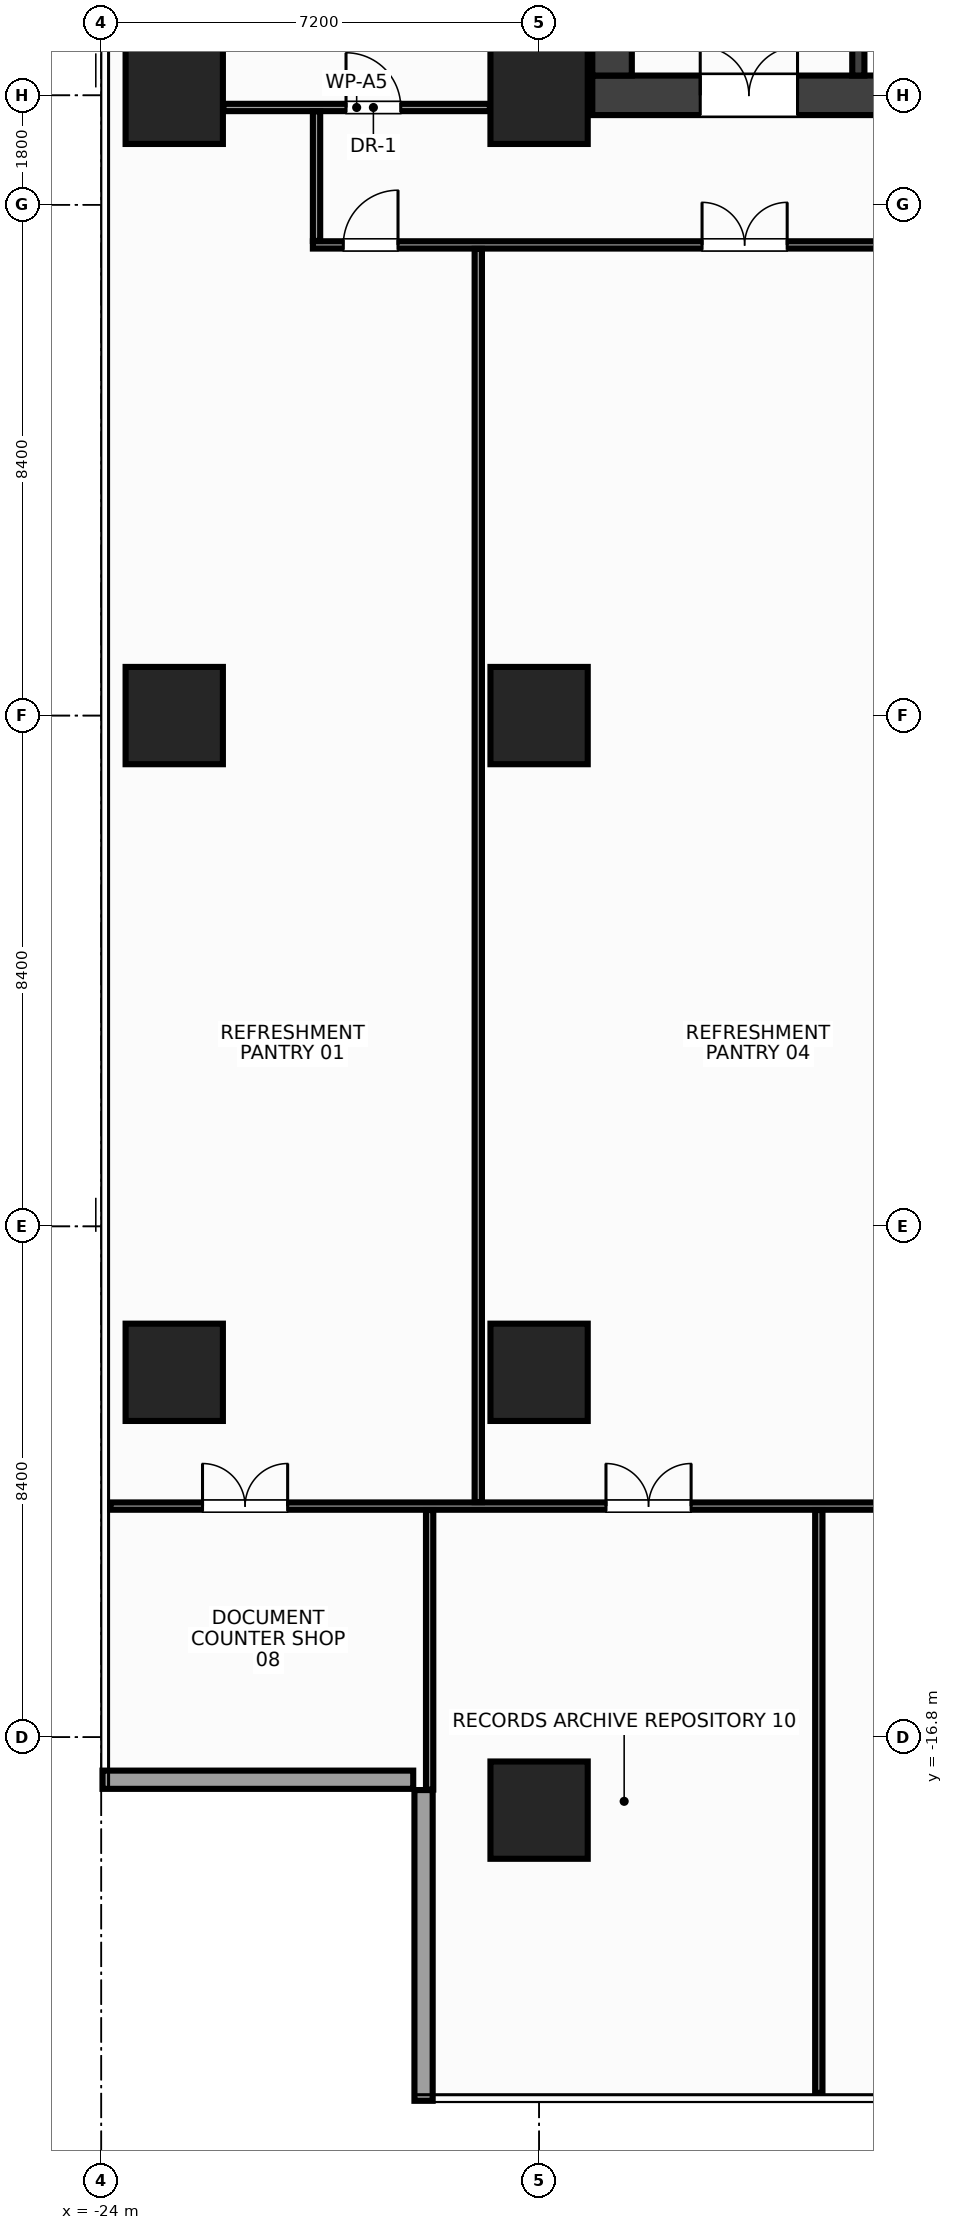
"""IFC4 building model, lengths in metres.
Left out: names, types, materials, properties, quantities, classifications, styles, units other than length and angle.
Written with IfcOpenShell. Run it as: python <this file> out.ifc"""

import sys

from ifc_helpers import new_model, si_unit, direction, frame, frame_2d, origin, origin_2d, place, context, subcontext, project, spatial, rectangle, extrude, source, transform, mapped, element, fill, save


model = new_model("IFC4")
c1 = context("Model", 3, precision=1e-05, world=origin(), true_north=direction((0.0, 1.0)))
c2 = subcontext(c1, "Body", "Model", "MODEL_VIEW")
j1 = project(units=[si_unit("LENGTHUNIT", "METRE"), si_unit("PLANEANGLEUNIT", "RADIAN")], contexts=[c1])
p1 = place(None, origin())
s1 = spatial("IfcSite", under=j1, at=p1, CompositionType="ELEMENT")
p2 = place(p1, origin())
s2 = spatial("IfcBuilding", under=s1, at=p2, CompositionType="ELEMENT")
p3 = place(p2, frame((0.0, 0.0, 182.0)))
s3 = spatial("IfcBuildingStorey", under=s2, at=p3, CompositionType="ELEMENT", Elevation=182.0)
m1 = source(origin(), c2, "Body", "SweptSolid", [
    extrude(rectangle(XDim=31.85, YDim=0.65, at=frame_2d((15.925, 0.0))), origin(), (0.0, 0.0, 1.0), 3.6),
])
p4 = place(p3, frame((-15.925, 10.2, 0.0), z_axis=(0.0, 0.0, 1.0), x_axis=(1.0, 0.0, 0.0)))
e1 = element("IfcWall", 1, at=p4, inside=s3, PredefinedType="SHEAR", context=c2, shape_type="MappedRepresentation", body=[
    mapped(m1, transform((0.0, 0.0, 0.0), x_axis=(1.0, 0.0, 0.0), y_axis=(0.0, 1.0, 0.0), z_axis=(0.0, 0.0, 1.0), scale=1.0)),
])
p5 = place(p4, frame((1.775, 0.0, 0.0)))
e2 = element("IfcOpeningElement", 2, at=p5, cuts=e1, PredefinedType="OPENING", context=c2, shape_type="SweptSolid", body=[
    extrude(rectangle(XDim=1.6, YDim=2.15, at=frame_2d((0.8, 1.075))), frame((0.0, 0.337, 0.0), z_axis=(0.0, -1.0, 0.0), x_axis=(1.0, 0.0, 0.0)), (0.0, 0.0, 1.0), 0.674),
])
p6 = place(p4, frame((28.475, 0.0, 0.0)))
e3 = element("IfcOpeningElement", 3, at=p6, cuts=e1, PredefinedType="OPENING", context=c2, shape_type="SweptSolid", body=[
    extrude(rectangle(XDim=1.6, YDim=2.15, at=frame_2d((0.8, 1.075))), frame((0.0, 0.337, 0.0), z_axis=(0.0, -1.0, 0.0), x_axis=(1.0, 0.0, 0.0)), (0.0, 0.0, 1.0), 0.674),
])
p7 = place(p4, frame((15.175, 0.0, 0.0)))
e4 = element("IfcOpeningElement", 4, at=p7, cuts=e1, PredefinedType="OPENING", context=c2, shape_type="SweptSolid", body=[
    extrude(rectangle(XDim=1.5, YDim=2.2, at=frame_2d((0.75, 1.1))), frame((0.0, 0.337, 0.0), z_axis=(0.0, -1.0, 0.0), x_axis=(1.0, 0.0, 0.0)), (0.0, 0.0, 1.0), 0.674),
])
m2 = source(origin(), c2, "Body", "SweptSolid", [
    extrude(rectangle(XDim=12.95, YDim=0.65, at=frame_2d((6.475, 0.0))), origin(), (0.0, 0.0, 1.0), 3.6),
])
p8 = place(p3, frame((-15.6, 10.525, 0.0), z_axis=(0.0, 0.0, 1.0), x_axis=(0.0, 1.0, 0.0)))
e5 = element("IfcWall", 5, at=p8, inside=s3, PredefinedType="SHEAR", context=c2, shape_type="MappedRepresentation", body=[
    mapped(m2, transform((0.0, 0.0, 0.0), x_axis=(1.0, 0.0, 0.0), y_axis=(0.0, 1.0, 0.0), z_axis=(0.0, 0.0, 1.0), scale=1.0)),
])
m3 = source(origin(), c2, "Body", "SweptSolid", [
    extrude(rectangle(XDim=3.125, YDim=0.2, at=frame_2d((1.562, 0.0))), origin(), (0.0, 0.0, 1.0), 3.6),
])
p9 = place(p3, frame((-11.55, 10.525, 0.0), z_axis=(0.0, 0.0, 1.0), x_axis=(0.0, 1.0, 0.0)))
e6 = element("IfcWall", 6, at=p9, inside=s3, PredefinedType="SHEAR", context=c2, shape_type="MappedRepresentation", body=[
    mapped(m3, transform((0.0, 0.0, 0.0), x_axis=(1.0, 0.0, 0.0), y_axis=(0.0, 1.0, 0.0), z_axis=(0.0, 0.0, 1.0), scale=1.0)),
])
p10 = place(p9, frame((0.9, 0.0, 0.0)))
e7 = element("IfcOpeningElement", 7, at=p10, cuts=e6, PredefinedType="OPENING", context=c2, shape_type="SweptSolid", body=[
    extrude(rectangle(XDim=1.1, YDim=2.15, at=frame_2d((0.55, 1.075))), frame((0.0, 0.112, 0.0), z_axis=(0.0, -1.0, 0.0), x_axis=(1.0, 0.0, 0.0)), (0.0, 0.0, 1.0), 0.224),
])
m4 = source(origin(), c2, "Body", "SweptSolid", [
    extrude(rectangle(XDim=1.6, YDim=1.6, at=origin_2d()), origin(), (0.0, 0.0, 1.0), 3.6),
])
for number, where, z_axis, x_axis in (
    (8, (-16.8, -18.0, 0.0), (0.0, 0.0, 1.0), (1.0, 0.0, 0.0)),
    (9, (-16.8, -10.8, 0.0), (0.0, 0.0, 1.0), (1.0, 0.0, 0.0)),
    (10, (-16.8, 0.0, 0.0), (0.0, 0.0, 1.0), (1.0, 0.0, 0.0)),
    (11, (-16.8, 10.2, 0.0), (0.0, 0.0, 1.0), (1.0, 0.0, 0.0)),
    (12, (-22.8, -10.8, 0.0), (0.0, 0.0, 1.0), (1.0, 0.0, 0.0)),
    (13, (-22.8, 0.0, 0.0), (0.0, 0.0, 1.0), (1.0, 0.0, 0.0)),
    (14, (-22.8, 10.2, 0.0), (0.0, 0.0, 1.0), (1.0, 0.0, 0.0)),
):
    element("IfcColumn", number, at=place(p3, frame(where, z_axis=z_axis, x_axis=x_axis)), inside=s3, PredefinedType="COLUMN", context=c2, shape_type="MappedRepresentation", body=[
        mapped(m4, transform((0.0, 0.0, 0.0), x_axis=(1.0, 0.0, 0.0), y_axis=(0.0, 1.0, 0.0), z_axis=(0.0, 0.0, 1.0), scale=1.0)),
    ])
m5 = source(origin(), c2, "Body", "SweptSolid", [
    extrude(rectangle(XDim=5.11, YDim=0.3, at=frame_2d((2.555, 0.0))), origin(), (0.0, 0.0, 1.0), 2.76),
])
p11 = place(p3, frame((-23.98, -17.5, 0.0), z_axis=(0.0, 0.0, 1.0), x_axis=(1.0, 0.0, 0.0)))
e15 = element("IfcWall", 15, at=p11, inside=s3, PredefinedType="STANDARD", context=c2, shape_type="MappedRepresentation", body=[
    mapped(m5, transform((0.0, 0.0, 0.0), x_axis=(1.0, 0.0, 0.0), y_axis=(0.0, 1.0, 0.0), z_axis=(0.0, 0.0, 1.0), scale=1.0)),
])
m6 = source(origin(), c2, "Body", "SweptSolid", [
    extrude(rectangle(XDim=5.11, YDim=0.3, at=frame_2d((2.555, 0.0))), origin(), (0.0, 0.0, 1.0), 2.76),
])
p12 = place(p3, frame((-18.7, -17.67, 0.0), z_axis=(0.0, 0.0, 1.0), x_axis=(0.0, -1.0, 0.0)))
e16 = element("IfcWall", 16, at=p12, inside=s3, PredefinedType="STANDARD", context=c2, shape_type="MappedRepresentation", body=[
    mapped(m6, transform((0.0, 0.0, 0.0), x_axis=(1.0, 0.0, 0.0), y_axis=(0.0, 1.0, 0.0), z_axis=(0.0, 0.0, 1.0), scale=1.0)),
])
m7 = source(origin(), c2, "Body", "SweptSolid", [
    extrude(rectangle(XDim=4.38, YDim=0.12, at=frame_2d((2.19, 0.0))), origin(), (0.0, 0.0, 1.0), 2.915),
])
p13 = place(p3, frame((-21.99, 10.0, 0.0), z_axis=(0.0, 0.0, 1.0), x_axis=(1.0, 0.0, 0.0)))
e17 = element("IfcWall", 17, at=p13, inside=s3, PredefinedType="PARTITIONING", context=c2, shape_type="MappedRepresentation", body=[
    mapped(m7, transform((0.0, 0.0, 0.0), x_axis=(1.0, 0.0, 0.0), y_axis=(0.0, 1.0, 0.0), z_axis=(0.0, 0.0, 1.0), scale=1.0)),
])
p14 = place(p13, frame((2.015, 0.0, 0.0)))
e18 = element("IfcOpeningElement", 18, at=p14, cuts=e17, PredefinedType="OPENING", context=c2, shape_type="SweptSolid", body=[
    extrude(rectangle(XDim=0.9, YDim=2.15, at=frame_2d((0.45, 1.075))), frame((0.0, 0.072, 0.0), z_axis=(0.0, -1.0, 0.0), x_axis=(1.0, 0.0, 0.0)), (0.0, 0.0, 1.0), 0.144),
])
m8 = source(origin(), c2, "Body", "SweptSolid", [
    extrude(rectangle(XDim=31.6, YDim=0.12, at=frame_2d((15.8, 0.0))), origin(), (0.0, 0.0, 1.0), 2.765),
])
p15 = place(p3, frame((-20.52, 7.74, 0.0), z_axis=(0.0, 0.0, 1.0), x_axis=(1.0, 0.0, 0.0)))
e19 = element("IfcWall", 19, at=p15, inside=s3, PredefinedType="PARTITIONING", context=c2, shape_type="MappedRepresentation", body=[
    mapped(m8, transform((0.0, 0.0, 0.0), x_axis=(1.0, 0.0, 0.0), y_axis=(0.0, 1.0, 0.0), z_axis=(0.0, 0.0, 1.0), scale=1.0)),
])
p16 = place(p15, frame((0.5, 0.0, 0.0)))
e20 = element("IfcOpeningElement", 20, at=p16, cuts=e19, PredefinedType="OPENING", context=c2, shape_type="SweptSolid", body=[
    extrude(rectangle(XDim=0.9, YDim=2.15, at=frame_2d((0.45, 1.075))), frame((0.0, 0.072, 0.0), z_axis=(0.0, -1.0, 0.0), x_axis=(1.0, 0.0, 0.0)), (0.0, 0.0, 1.0), 0.144),
])
p17 = place(p15, frame((6.4, 0.0, 0.0)))
e21 = element("IfcOpeningElement", 21, at=p17, cuts=e19, PredefinedType="OPENING", context=c2, shape_type="SweptSolid", body=[
    extrude(rectangle(XDim=1.4, YDim=2.2, at=frame_2d((0.7, 1.1))), frame((0.0, 0.072, 0.0), z_axis=(0.0, -1.0, 0.0), x_axis=(1.0, 0.0, 0.0)), (0.0, 0.0, 1.0), 0.144),
])
p18 = place(p15, frame((15.52, 0.0, 0.0)))
e22 = element("IfcOpeningElement", 22, at=p18, cuts=e19, PredefinedType="OPENING", context=c2, shape_type="SweptSolid", body=[
    extrude(rectangle(XDim=1.4, YDim=2.2, at=frame_2d((0.7, 1.1))), frame((0.0, 0.072, 0.0), z_axis=(0.0, -1.0, 0.0), x_axis=(1.0, 0.0, 0.0)), (0.0, 0.0, 1.0), 0.144),
])
p19 = place(p15, frame((24.12, 0.0, 0.0)))
e23 = element("IfcOpeningElement", 23, at=p19, cuts=e19, PredefinedType="OPENING", context=c2, shape_type="SweptSolid", body=[
    extrude(rectangle(XDim=1.4, YDim=2.2, at=frame_2d((0.7, 1.1))), frame((0.0, 0.072, 0.0), z_axis=(0.0, -1.0, 0.0), x_axis=(1.0, 0.0, 0.0)), (0.0, 0.0, 1.0), 0.144),
])
p20 = place(p15, frame((29.63, 0.0, 0.0)))
e24 = element("IfcOpeningElement", 24, at=p20, cuts=e19, PredefinedType="OPENING", context=c2, shape_type="SweptSolid", body=[
    extrude(rectangle(XDim=1.4, YDim=2.2, at=frame_2d((0.7, 1.1))), frame((0.0, 0.072, 0.0), z_axis=(0.0, -1.0, 0.0), x_axis=(1.0, 0.0, 0.0)), (0.0, 0.0, 1.0), 0.144),
])
m9 = source(origin(), c2, "Body", "SweptSolid", [
    extrude(rectangle(XDim=2.13, YDim=0.12, at=frame_2d((1.065, 0.0))), origin(), (0.0, 0.0, 1.0), 3.38),
])
p21 = place(p3, frame((-20.46, 7.805, 0.0), z_axis=(0.0, 0.0, 1.0), x_axis=(0.0, 1.0, 0.0)))
e25 = element("IfcWall", 25, at=p21, inside=s3, PredefinedType="PARTITIONING", context=c2, shape_type="MappedRepresentation", body=[
    mapped(m9, transform((0.0, 0.0, 0.0), x_axis=(1.0, 0.0, 0.0), y_axis=(0.0, 1.0, 0.0), z_axis=(0.0, 0.0, 1.0), scale=1.0)),
])
m10 = source(origin(), c2, "Body", "SweptSolid", [
    extrude(rectangle(XDim=34.925, YDim=0.12, at=frame_2d((17.462, 0.0))), origin(), (0.0, 0.0, 1.0), 2.965),
])
p22 = place(p3, frame((-23.85, -13.0, 0.0), z_axis=(0.0, 0.0, 1.0), x_axis=(1.0, 0.0, 0.0)))
e26 = element("IfcWall", 26, at=p22, inside=s3, PredefinedType="PARTITIONING", context=c2, shape_type="MappedRepresentation", body=[
    mapped(m10, transform((0.0, 0.0, 0.0), x_axis=(1.0, 0.0, 0.0), y_axis=(0.0, 1.0, 0.0), z_axis=(0.0, 0.0, 1.0), scale=1.0)),
])
p23 = place(p22, frame((1.515, 0.0, 0.0)))
e27 = element("IfcOpeningElement", 27, at=p23, cuts=e26, PredefinedType="OPENING", context=c2, shape_type="SweptSolid", body=[
    extrude(rectangle(XDim=1.4, YDim=2.2, at=frame_2d((0.7, 1.1))), frame((0.0, 0.072, 0.0), z_axis=(0.0, -1.0, 0.0), x_axis=(1.0, 0.0, 0.0)), (0.0, 0.0, 1.0), 0.144),
])
p24 = place(p22, frame((8.15, 0.0, 0.0)))
e28 = element("IfcOpeningElement", 28, at=p24, cuts=e26, PredefinedType="OPENING", context=c2, shape_type="SweptSolid", body=[
    extrude(rectangle(XDim=1.4, YDim=2.2, at=frame_2d((0.7, 1.1))), frame((0.0, 0.072, 0.0), z_axis=(0.0, -1.0, 0.0), x_axis=(1.0, 0.0, 0.0)), (0.0, 0.0, 1.0), 0.144),
])
m11 = source(origin(), c2, "Body", "SweptSolid", [
    extrude(rectangle(XDim=20.61, YDim=0.12, at=frame_2d((10.305, 0.0))), origin(), (0.0, 0.0, 1.0), 2.915),
])
p25 = place(p3, frame((-17.8, -12.935, 0.0), z_axis=(0.0, 0.0, 1.0), x_axis=(0.0, 1.0, 0.0)))
e29 = element("IfcWall", 29, at=p25, inside=s3, PredefinedType="PARTITIONING", context=c2, shape_type="MappedRepresentation", body=[
    mapped(m11, transform((0.0, 0.0, 0.0), x_axis=(1.0, 0.0, 0.0), y_axis=(0.0, 1.0, 0.0), z_axis=(0.0, 0.0, 1.0), scale=1.0)),
])
m12 = source(origin(), c2, "Body", "SweptSolid", [
    extrude(rectangle(XDim=4.597, YDim=0.12, at=frame_2d((2.299, 0.0))), origin(), (0.0, 0.0, 1.0), 3.38),
])
p26 = place(p3, frame((-18.6, -17.662, 0.0), z_axis=(0.0, 0.0, 1.0), x_axis=(0.0, 1.0, 0.0)))
e30 = element("IfcWall", 30, at=p26, inside=s3, PredefinedType="PARTITIONING", context=c2, shape_type="MappedRepresentation", body=[
    mapped(m12, transform((0.0, 0.0, 0.0), x_axis=(1.0, 0.0, 0.0), y_axis=(0.0, 1.0, 0.0), z_axis=(0.0, 0.0, 1.0), scale=1.0)),
])
m13 = source(origin(), c2, "Body", "SweptSolid", [
    extrude(rectangle(XDim=9.585, YDim=0.12, at=frame_2d((4.792, 0.0))), origin(), (0.0, 0.0, 1.0), 2.915),
])
p27 = place(p3, frame((-12.2, -22.65, 0.0), z_axis=(0.0, 0.0, 1.0), x_axis=(0.0, 1.0, 0.0)))
e31 = element("IfcWall", 31, at=p27, inside=s3, PredefinedType="PARTITIONING", context=c2, shape_type="MappedRepresentation", body=[
    mapped(m13, transform((0.0, 0.0, 0.0), x_axis=(1.0, 0.0, 0.0), y_axis=(0.0, 1.0, 0.0), z_axis=(0.0, 0.0, 1.0), scale=1.0)),
])
m14 = source(origin(), c2, "Body", "SweptSolid", [
    extrude(rectangle(XDim=1.6, YDim=2.15, at=frame_2d((0.8, 1.075))), frame((0.0, 0.025, 0.0), z_axis=(0.0, -1.0, 0.0), x_axis=(1.0, 0.0, 0.0)), (0.0, 0.0, 1.0), 0.05),
])
p28 = place(p5, origin())
e32 = element("IfcDoor", 32, at=p28, inside=s3, OperationType="DOUBLE_DOOR_SINGLE_SWING", PredefinedType="DOOR", context=c2, shape_type="MappedRepresentation", body=[
    mapped(m14, transform((0.0, 0.0, 0.0), x_axis=(1.0, 0.0, 0.0), y_axis=(0.0, 1.0, 0.0), z_axis=(0.0, 0.0, 1.0), scale=1.0)),
])
fill(e2, e32)
m15 = source(origin(), c2, "Body", "SweptSolid", [
    extrude(rectangle(XDim=0.9, YDim=2.15, at=frame_2d((0.45, 1.075))), frame((0.0, 0.025, 0.0), z_axis=(0.0, -1.0, 0.0), x_axis=(1.0, 0.0, 0.0)), (0.0, 0.0, 1.0), 0.05),
])
p29 = place(p14, origin())
e33 = element("IfcDoor", 33, at=p29, inside=s3, OperationType="SINGLE_SWING_LEFT", PredefinedType="DOOR", context=c2, shape_type="MappedRepresentation", body=[
    mapped(m15, transform((0.0, 0.0, 0.0), x_axis=(1.0, 0.0, 0.0), y_axis=(0.0, 1.0, 0.0), z_axis=(0.0, 0.0, 1.0), scale=1.0)),
])
fill(e18, e33)
p30 = place(p16, origin())
e34 = element("IfcDoor", 34, at=p30, inside=s3, OperationType="SINGLE_SWING_RIGHT", PredefinedType="DOOR", context=c2, shape_type="MappedRepresentation", body=[
    mapped(m15, transform((0.0, 0.0, 0.0), x_axis=(1.0, 0.0, 0.0), y_axis=(0.0, 1.0, 0.0), z_axis=(0.0, 0.0, 1.0), scale=1.0)),
])
fill(e20, e34)
m16 = source(origin(), c2, "Body", "SweptSolid", [
    extrude(rectangle(XDim=1.4, YDim=2.2, at=frame_2d((0.7, 1.1))), frame((0.0, 0.025, 0.0), z_axis=(0.0, -1.0, 0.0), x_axis=(1.0, 0.0, 0.0)), (0.0, 0.0, 1.0), 0.05),
])
p31 = place(p17, origin())
e35 = element("IfcDoor", 35, at=p31, inside=s3, OperationType="DOUBLE_DOOR_SINGLE_SWING", PredefinedType="DOOR", context=c2, shape_type="MappedRepresentation", body=[
    mapped(m16, transform((0.0, 0.0, 0.0), x_axis=(1.0, 0.0, 0.0), y_axis=(0.0, 1.0, 0.0), z_axis=(0.0, 0.0, 1.0), scale=1.0)),
])
fill(e21, e35)
p32 = place(p23, origin())
e36 = element("IfcDoor", 36, at=p32, inside=s3, OperationType="DOUBLE_DOOR_SINGLE_SWING", PredefinedType="DOOR", context=c2, shape_type="MappedRepresentation", body=[
    mapped(m16, transform((0.0, 0.0, 0.0), x_axis=(1.0, 0.0, 0.0), y_axis=(0.0, 1.0, 0.0), z_axis=(0.0, 0.0, 1.0), scale=1.0)),
])
fill(e27, e36)
p33 = place(p24, origin())
e37 = element("IfcDoor", 37, at=p33, inside=s3, OperationType="DOUBLE_DOOR_SINGLE_SWING", PredefinedType="DOOR", context=c2, shape_type="MappedRepresentation", body=[
    mapped(m16, transform((0.0, 0.0, 0.0), x_axis=(1.0, 0.0, 0.0), y_axis=(0.0, 1.0, 0.0), z_axis=(0.0, 0.0, 1.0), scale=1.0)),
])
fill(e28, e37)
save(model, sys.argv[1])
